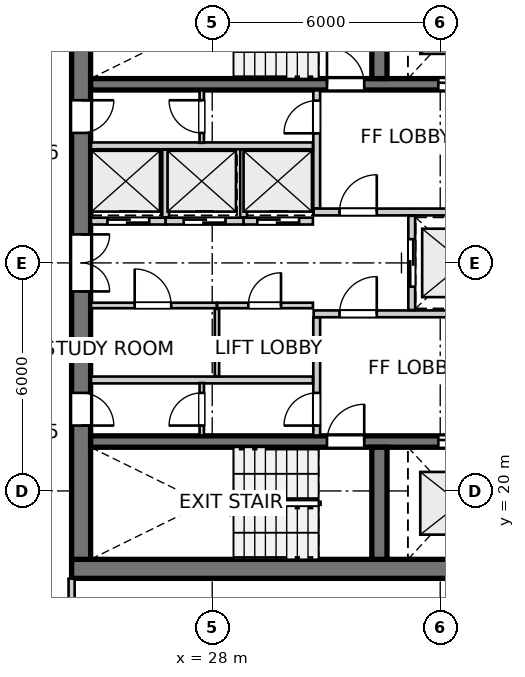
"""IFC4 building model, lengths in metres.
Left out: names, types, materials, properties, quantities, classifications, styles, units other than length and angle.
Written with IfcOpenShell. Run it as: python <this file> out.ifc"""

import sys

from ifc_helpers import new_model, si_unit, direction, frame, frame_2d, origin, place, context, subcontext, project, spatial, rectangle, extrude, source, transform, mapped, element, fill, save


model = new_model("IFC4")
c1 = context("Model", 3, precision=1e-05, world=origin(), true_north=direction((0.0, 1.0)))
c2 = subcontext(c1, "Body", "Model", "MODEL_VIEW")
j1 = project(units=[si_unit("LENGTHUNIT", "METRE"), si_unit("PLANEANGLEUNIT", "RADIAN")], contexts=[c1])
p1 = place(None, origin())
s1 = spatial("IfcSite", under=j1, at=p1, CompositionType="ELEMENT")
p2 = place(p1, origin())
s2 = spatial("IfcBuilding", under=s1, at=p2, CompositionType="ELEMENT")
p3 = place(p2, frame((0.0, 0.0, 205.2)))
s3 = spatial("IfcBuildingStorey", under=s2, at=p3, CompositionType="ELEMENT", Elevation=205.2)
p4 = place(p3, frame((24.3, 17.95, 0.0), z_axis=(0.0, 0.0, 1.0), x_axis=(1.0, 0.0, 0.0)))
e1 = element("IfcWall", 1, at=p4, inside=s3, PredefinedType="SHEAR", context=c2, shape_type="SweptSolid", body=[
    extrude(rectangle(XDim=12.1, YDim=0.5, at=frame_2d((6.05, 0.0))), origin(), (0.0, 0.0, 1.0), 2.935),
])
p5 = place(p3, frame((24.55, 33.8, 0.0), z_axis=(0.0, 0.0, 1.0), x_axis=(0.0, -1.0, 0.0)))
e2 = element("IfcWall", 2, at=p5, inside=s3, PredefinedType="SHEAR", context=c2, shape_type="SweptSolid", body=[
    extrude(rectangle(XDim=15.6, YDim=0.5, at=frame_2d((7.8, 0.0))), origin(), (0.0, 0.0, 1.0), 2.935),
])
p6 = place(p5, frame((7.05, 0.0, 0.0)))
e3 = element("IfcOpeningElement", 3, at=p6, cuts=e2, PredefinedType="OPENING", context=c2, shape_type="SweptSolid", body=[
    extrude(rectangle(XDim=1.5, YDim=2.15, at=frame_2d((0.75, 1.075))), frame((0.0, 0.26, 0.0), z_axis=(0.0, -1.0, 0.0), x_axis=(1.0, 0.0, 0.0)), (0.0, 0.0, 1.0), 0.52),
])
p7 = place(p5, frame((3.52, 0.0, 0.0)))
e4 = element("IfcOpeningElement", 4, at=p7, cuts=e2, PredefinedType="OPENING", context=c2, shape_type="SweptSolid", body=[
    extrude(rectangle(XDim=0.86, YDim=2.05, at=frame_2d((0.43, 1.025))), frame((0.0, 0.26, 0.0), z_axis=(0.0, -1.0, 0.0), x_axis=(1.0, 0.0, 0.0)), (0.0, 0.0, 1.0), 0.52),
])
p8 = place(p5, frame((11.22, 0.0, 0.0)))
e5 = element("IfcOpeningElement", 5, at=p8, cuts=e2, PredefinedType="OPENING", context=c2, shape_type="SweptSolid", body=[
    extrude(rectangle(XDim=0.86, YDim=2.05, at=frame_2d((0.43, 1.025))), frame((0.0, 0.26, 0.0), z_axis=(0.0, -1.0, 0.0), x_axis=(1.0, 0.0, 0.0)), (0.0, 0.0, 1.0), 0.52),
])
p9 = place(p3, frame((24.8, 21.3, 0.0), z_axis=(0.0, 0.0, 1.0), x_axis=(1.0, 0.0, 0.0)))
e6 = element("IfcWall", 6, at=p9, inside=s3, PredefinedType="SHEAR", context=c2, shape_type="SweptSolid", body=[
    extrude(rectangle(XDim=11.1, YDim=0.3, at=frame_2d((5.55, 0.0))), origin(), (0.0, 0.0, 1.0), 2.935),
])
p10 = place(p9, frame((6.22, 0.0, 0.0)))
e7 = element("IfcOpeningElement", 7, at=p10, cuts=e6, PredefinedType="OPENING", context=c2, shape_type="SweptSolid", body=[
    extrude(rectangle(XDim=0.98, YDim=2.15, at=frame_2d((0.49, 1.075))), frame((0.0, 0.16, 0.0), z_axis=(0.0, -1.0, 0.0), x_axis=(1.0, 0.0, 0.0)), (0.0, 0.0, 1.0), 0.32),
])
p11 = place(p9, frame((9.15, 0.0, 0.0)))
e8 = element("IfcOpeningElement", 8, at=p11, cuts=e6, PredefinedType="OPENING", context=c2, shape_type="SweptSolid", body=[
    extrude(rectangle(XDim=1.15, YDim=2.15, at=frame_2d((0.575, 1.075))), frame((0.0, 0.16, 0.0), z_axis=(0.0, -1.0, 0.0), x_axis=(1.0, 0.0, 0.0)), (0.0, 0.0, 1.0), 0.32),
])
p12 = place(p3, frame((32.4, 18.2, 0.0), z_axis=(0.0, 0.0, 1.0), x_axis=(0.0, 1.0, 0.0)))
e9 = element("IfcWall", 9, at=p12, inside=s3, PredefinedType="SHEAR", context=c2, shape_type="SweptSolid", body=[
    extrude(rectangle(XDim=2.95, YDim=0.4, at=frame_2d((1.475, 0.0))), origin(), (0.0, 0.0, 1.0), 2.935),
])
p13 = place(p3, frame((24.8, 30.7, 0.0), z_axis=(0.0, 0.0, 1.0), x_axis=(1.0, 0.0, 0.0)))
e10 = element("IfcWall", 10, at=p13, inside=s3, PredefinedType="SHEAR", context=c2, shape_type="SweptSolid", body=[
    extrude(rectangle(XDim=11.1, YDim=0.3, at=frame_2d((5.55, 0.0))), origin(), (0.0, 0.0, 1.0), 2.935),
])
p14 = place(p13, frame((6.22, 0.0, 0.0)))
e11 = element("IfcOpeningElement", 11, at=p14, cuts=e10, PredefinedType="OPENING", context=c2, shape_type="SweptSolid", body=[
    extrude(rectangle(XDim=0.98, YDim=2.15, at=frame_2d((0.49, 1.075))), frame((0.0, 0.16, 0.0), z_axis=(0.0, -1.0, 0.0), x_axis=(1.0, 0.0, 0.0)), (0.0, 0.0, 1.0), 0.32),
])
p15 = place(p13, frame((9.15, 0.0, 0.0)))
e12 = element("IfcOpeningElement", 12, at=p15, cuts=e10, PredefinedType="OPENING", context=c2, shape_type="SweptSolid", body=[
    extrude(rectangle(XDim=1.15, YDim=2.15, at=frame_2d((0.575, 1.075))), frame((0.0, 0.16, 0.0), z_axis=(0.0, -1.0, 0.0), x_axis=(1.0, 0.0, 0.0)), (0.0, 0.0, 1.0), 0.32),
])
p16 = place(p3, frame((32.4, 30.85, 0.0), z_axis=(0.0, 0.0, 1.0), x_axis=(0.0, 1.0, 0.0)))
e13 = element("IfcWall", 13, at=p16, inside=s3, PredefinedType="SHEAR", context=c2, shape_type="SweptSolid", body=[
    extrude(rectangle(XDim=2.95, YDim=0.4, at=frame_2d((1.475, 0.0))), origin(), (0.0, 0.0, 1.0), 2.935),
])
p17 = place(p3, frame((30.75, 21.46, 0.0), z_axis=(0.0, 0.0, 1.0), x_axis=(0.0, 1.0, 0.0)))
e14 = element("IfcWall", 14, at=p17, inside=s3, PredefinedType="PARTITIONING", context=c2, shape_type="SweptSolid", body=[
    extrude(rectangle(XDim=3.11, YDim=0.18, at=frame_2d((1.555, 0.0))), origin(), (0.0, 0.0, 1.0), 2.935),
])
p18 = place(p17, frame((0.26, 0.0, 0.0)))
e15 = element("IfcOpeningElement", 15, at=p18, cuts=e14, PredefinedType="OPENING", context=c2, shape_type="SweptSolid", body=[
    extrude(rectangle(XDim=0.86, YDim=2.05, at=frame_2d((0.43, 1.025))), frame((0.0, 0.1, 0.0), z_axis=(0.0, -1.0, 0.0), x_axis=(1.0, 0.0, 0.0)), (0.0, 0.0, 1.0), 0.2),
])
p19 = place(p3, frame((30.67, 24.66, 0.0), z_axis=(0.0, 0.0, 1.0), x_axis=(1.0, 0.0, 0.0)))
e16 = element("IfcWall", 16, at=p19, inside=s3, PredefinedType="PARTITIONING", context=c2, shape_type="SweptSolid", body=[
    extrude(rectangle(XDim=5.22, YDim=0.18, at=frame_2d((2.61, 0.0))), origin(), (0.0, 0.0, 1.0), 2.935),
])
p20 = place(p19, frame((0.68, 0.0, 0.0)))
e17 = element("IfcOpeningElement", 17, at=p20, cuts=e16, PredefinedType="OPENING", context=c2, shape_type="SweptSolid", body=[
    extrude(rectangle(XDim=0.98, YDim=2.15, at=frame_2d((0.49, 1.075))), frame((0.0, 0.1, 0.0), z_axis=(0.0, -1.0, 0.0), x_axis=(1.0, 0.0, 0.0)), (0.0, 0.0, 1.0), 0.2),
])
p21 = place(p3, frame((30.75, 27.43, 0.0), z_axis=(0.0, 0.0, 1.0), x_axis=(0.0, 1.0, 0.0)))
e18 = element("IfcWall", 18, at=p21, inside=s3, PredefinedType="PARTITIONING", context=c2, shape_type="SweptSolid", body=[
    extrude(rectangle(XDim=3.11, YDim=0.18, at=frame_2d((1.555, 0.0))), origin(), (0.0, 0.0, 1.0), 2.935),
])
p22 = place(p21, frame((1.98, 0.0, 0.0)))
e19 = element("IfcOpeningElement", 19, at=p22, cuts=e18, PredefinedType="OPENING", context=c2, shape_type="SweptSolid", body=[
    extrude(rectangle(XDim=0.86, YDim=2.05, at=frame_2d((0.43, 1.025))), frame((0.0, 0.1, 0.0), z_axis=(0.0, -1.0, 0.0), x_axis=(1.0, 0.0, 0.0)), (0.0, 0.0, 1.0), 0.2),
])
p23 = place(p3, frame((30.67, 27.34, 0.0), z_axis=(0.0, 0.0, 1.0), x_axis=(1.0, 0.0, 0.0)))
e20 = element("IfcWall", 20, at=p23, inside=s3, PredefinedType="PARTITIONING", context=c2, shape_type="SweptSolid", body=[
    extrude(rectangle(XDim=5.22, YDim=0.18, at=frame_2d((2.61, 0.0))), origin(), (0.0, 0.0, 1.0), 2.935),
])
p24 = place(p23, frame((0.68, 0.0, 0.0)))
e21 = element("IfcOpeningElement", 21, at=p24, cuts=e20, PredefinedType="OPENING", context=c2, shape_type="SweptSolid", body=[
    extrude(rectangle(XDim=0.98, YDim=2.15, at=frame_2d((0.49, 1.075))), frame((0.0, 0.1, 0.0), z_axis=(0.0, -1.0, 0.0), x_axis=(1.0, 0.0, 0.0)), (0.0, 0.0, 1.0), 0.2),
])
p25 = place(p3, frame((33.25, 24.76, 0.0), z_axis=(0.0, 0.0, 1.0), x_axis=(0.0, 1.0, 0.0)))
e22 = element("IfcWall", 22, at=p25, inside=s3, PredefinedType="PARTITIONING", context=c2, shape_type="SweptSolid", body=[
    extrude(rectangle(XDim=2.48, YDim=0.18, at=frame_2d((1.24, 0.0))), origin(), (0.0, 0.0, 1.0), 2.935),
])
p26 = place(p25, frame((0.615, 0.0, 0.0)))
e23 = element("IfcOpeningElement", 23, at=p26, cuts=e22, PredefinedType="OPENING", context=c2, shape_type="SweptSolid", body=[
    extrude(rectangle(XDim=1.25, YDim=2.15, at=frame_2d((0.625, 1.075))), frame((0.0, 0.1, 0.0), z_axis=(0.0, -1.0, 0.0), x_axis=(1.0, 0.0, 0.0)), (0.0, 0.0, 1.0), 0.2),
])
p27 = place(p3, frame((24.81, 22.92, 0.0), z_axis=(0.0, 0.0, 1.0), x_axis=(1.0, 0.0, 0.0)))
e24 = element("IfcWall", 24, at=p27, inside=s3, PredefinedType="PARTITIONING", context=c2, shape_type="SweptSolid", body=[
    extrude(rectangle(XDim=5.84, YDim=0.18, at=frame_2d((2.92, 0.0))), origin(), (0.0, 0.0, 1.0), 2.935),
])
p28 = place(p3, frame((24.81, 24.88, 0.0), z_axis=(0.0, 0.0, 1.0), x_axis=(1.0, 0.0, 0.0)))
e25 = element("IfcWall", 25, at=p28, inside=s3, PredefinedType="PARTITIONING", context=c2, shape_type="SweptSolid", body=[
    extrude(rectangle(XDim=3.31, YDim=0.145, at=frame_2d((1.655, 0.0))), origin(), (0.0, 0.0, 1.0), 2.935),
])
p29 = place(p28, frame((1.15, 0.0, 0.0)))
e26 = element("IfcOpeningElement", 26, at=p29, cuts=e25, PredefinedType="OPENING", context=c2, shape_type="SweptSolid", body=[
    extrude(rectangle(XDim=0.96, YDim=2.1, at=frame_2d((0.48, 1.05))), frame((0.0, 0.083, 0.0), z_axis=(0.0, -1.0, 0.0), x_axis=(1.0, 0.0, 0.0)), (0.0, 0.0, 1.0), 0.165),
])
p30 = place(p3, frame((28.13, 24.88, 0.0), z_axis=(0.0, 0.0, 1.0), x_axis=(1.0, 0.0, 0.0)))
e27 = element("IfcWall", 27, at=p30, inside=s3, PredefinedType="PARTITIONING", context=c2, shape_type="SweptSolid", body=[
    extrude(rectangle(XDim=2.52, YDim=0.145, at=frame_2d((1.26, 0.0))), origin(), (0.0, 0.0, 1.0), 2.935),
])
p31 = place(p30, frame((0.82, 0.0, 0.0)))
e28 = element("IfcOpeningElement", 28, at=p31, cuts=e27, PredefinedType="OPENING", context=c2, shape_type="SweptSolid", body=[
    extrude(rectangle(XDim=0.86, YDim=2.05, at=frame_2d((0.43, 1.025))), frame((0.0, 0.083, 0.0), z_axis=(0.0, -1.0, 0.0), x_axis=(1.0, 0.0, 0.0)), (0.0, 0.0, 1.0), 0.165),
])
p32 = place(p3, frame((28.125, 23.02, 0.0), z_axis=(0.0, 0.0, 1.0), x_axis=(0.0, 1.0, 0.0)))
e29 = element("IfcWall", 29, at=p32, inside=s3, PredefinedType="PARTITIONING", context=c2, shape_type="SweptSolid", body=[
    extrude(rectangle(XDim=1.77, YDim=0.115, at=frame_2d((0.885, 0.0))), origin(), (0.0, 0.0, 1.0), 2.935),
])
p33 = place(p3, frame((24.81, 29.08, 0.0), z_axis=(0.0, 0.0, 1.0), x_axis=(1.0, 0.0, 0.0)))
e30 = element("IfcWall", 30, at=p33, inside=s3, PredefinedType="PARTITIONING", context=c2, shape_type="SweptSolid", body=[
    extrude(rectangle(XDim=5.84, YDim=0.18, at=frame_2d((2.92, 0.0))), origin(), (0.0, 0.0, 1.0), 2.935),
])
p34 = place(p3, frame((24.81, 27.1, 0.0), z_axis=(0.0, 0.0, 1.0), x_axis=(1.0, 0.0, 0.0)))
e31 = element("IfcWall", 31, at=p34, inside=s3, PredefinedType="PARTITIONING", context=c2, shape_type="SweptSolid", body=[
    extrude(rectangle(XDim=1.965, YDim=0.18, at=frame_2d((0.982, 0.0))), origin(), (0.0, 0.0, 1.0), 2.935),
])
p35 = place(p34, frame((0.433, 0.0, 0.0)))
e32 = element("IfcOpeningElement", 32, at=p35, cuts=e31, PredefinedType="OPENING", context=c2, shape_type="SweptSolid", body=[
    extrude(rectangle(XDim=1.1, YDim=2.15, at=frame_2d((0.55, 1.075))), frame((0.0, 0.1, 0.0), z_axis=(0.0, -1.0, 0.0), x_axis=(1.0, 0.0, 0.0)), (0.0, 0.0, 1.0), 0.2),
])
p36 = place(p3, frame((26.775, 27.1, 0.0), z_axis=(0.0, 0.0, 1.0), x_axis=(1.0, 0.0, 0.0)))
e33 = element("IfcWall", 33, at=p36, inside=s3, PredefinedType="PARTITIONING", context=c2, shape_type="SweptSolid", body=[
    extrude(rectangle(XDim=2.05, YDim=0.18, at=frame_2d((1.025, 0.0))), origin(), (0.0, 0.0, 1.0), 2.935),
])
p37 = place(p36, frame((0.475, 0.0, 0.0)))
e34 = element("IfcOpeningElement", 34, at=p37, cuts=e33, PredefinedType="OPENING", context=c2, shape_type="SweptSolid", body=[
    extrude(rectangle(XDim=1.1, YDim=2.15, at=frame_2d((0.55, 1.075))), frame((0.0, 0.1, 0.0), z_axis=(0.0, -1.0, 0.0), x_axis=(1.0, 0.0, 0.0)), (0.0, 0.0, 1.0), 0.2),
])
p38 = place(p3, frame((26.775, 27.2, 0.0), z_axis=(0.0, 0.0, 1.0), x_axis=(0.0, 1.0, 0.0)))
e35 = element("IfcWall", 35, at=p38, inside=s3, PredefinedType="PARTITIONING", context=c2, shape_type="SweptSolid", body=[
    extrude(rectangle(XDim=1.78, YDim=0.18, at=frame_2d((0.89, 0.0))), origin(), (0.0, 0.0, 1.0), 2.935),
])
p39 = place(p3, frame((28.825, 27.1, 0.0), z_axis=(0.0, 0.0, 1.0), x_axis=(1.0, 0.0, 0.0)))
e36 = element("IfcWall", 36, at=p39, inside=s3, PredefinedType="PARTITIONING", context=c2, shape_type="SweptSolid", body=[
    extrude(rectangle(XDim=1.825, YDim=0.18, at=frame_2d((0.913, 0.0))), origin(), (0.0, 0.0, 1.0), 2.935),
])
p40 = place(p39, frame((0.363, 0.0, 0.0)))
e37 = element("IfcOpeningElement", 37, at=p40, cuts=e36, PredefinedType="OPENING", context=c2, shape_type="SweptSolid", body=[
    extrude(rectangle(XDim=1.1, YDim=2.15, at=frame_2d((0.55, 1.075))), frame((0.0, 0.1, 0.0), z_axis=(0.0, -1.0, 0.0), x_axis=(1.0, 0.0, 0.0)), (0.0, 0.0, 1.0), 0.2),
])
p41 = place(p3, frame((28.825, 27.2, 0.0), z_axis=(0.0, 0.0, 1.0), x_axis=(0.0, 1.0, 0.0)))
e38 = element("IfcWall", 38, at=p41, inside=s3, PredefinedType="PARTITIONING", context=c2, shape_type="SweptSolid", body=[
    extrude(rectangle(XDim=1.78, YDim=0.18, at=frame_2d((0.89, 0.0))), origin(), (0.0, 0.0, 1.0), 2.935),
])
p42 = place(p3, frame((27.725, 21.46, 0.0), z_axis=(0.0, 0.0, 1.0), x_axis=(0.0, 1.0, 0.0)))
e39 = element("IfcWall", 39, at=p42, inside=s3, PredefinedType="PARTITIONING", context=c2, shape_type="SweptSolid", body=[
    extrude(rectangle(XDim=1.38, YDim=0.115, at=frame_2d((0.69, 0.0))), origin(), (0.0, 0.0, 1.0), 2.935),
])
p43 = place(p42, frame((0.26, 0.0, 0.0)))
e40 = element("IfcOpeningElement", 40, at=p43, cuts=e39, PredefinedType="OPENING", context=c2, shape_type="SweptSolid", body=[
    extrude(rectangle(XDim=0.86, YDim=2.05, at=frame_2d((0.43, 1.025))), frame((0.0, 0.067, 0.0), z_axis=(0.0, -1.0, 0.0), x_axis=(1.0, 0.0, 0.0)), (0.0, 0.0, 1.0), 0.135),
])
p44 = place(p3, frame((27.725, 29.16, 0.0), z_axis=(0.0, 0.0, 1.0), x_axis=(0.0, 1.0, 0.0)))
e41 = element("IfcWall", 41, at=p44, inside=s3, PredefinedType="PARTITIONING", context=c2, shape_type="SweptSolid", body=[
    extrude(rectangle(XDim=1.38, YDim=0.115, at=frame_2d((0.69, 0.0))), origin(), (0.0, 0.0, 1.0), 2.935),
])
p45 = place(p44, frame((0.26, 0.0, 0.0)))
e42 = element("IfcOpeningElement", 42, at=p45, cuts=e41, PredefinedType="OPENING", context=c2, shape_type="SweptSolid", body=[
    extrude(rectangle(XDim=0.86, YDim=2.05, at=frame_2d((0.43, 1.025))), frame((0.0, 0.067, 0.0), z_axis=(0.0, -1.0, 0.0), x_axis=(1.0, 0.0, 0.0)), (0.0, 0.0, 1.0), 0.135),
])
p46 = place(p3, frame((24.3, 15.002, 0.0), z_axis=(0.0, 0.0, 1.0), x_axis=(0.0, 1.0, 0.0)))
e43 = element("IfcWall", 43, at=p46, inside=s3, PredefinedType="PARTITIONING", context=c2, shape_type="SweptSolid", body=[
    extrude(rectangle(XDim=2.69, YDim=0.16, at=frame_2d((1.345, 0.0))), origin(), (0.0, 0.0, 1.0), 2.935),
])
m1 = source(origin(), c2, "Body", "SweptSolid", [
    extrude(rectangle(XDim=0.98, YDim=2.15, at=frame_2d((0.49, 1.075))), frame((0.0, 0.025, 0.0), z_axis=(0.0, -1.0, 0.0), x_axis=(1.0, 0.0, 0.0)), (0.0, 0.0, 1.0), 0.05),
])
p47 = place(p10, origin())
e44 = element("IfcDoor", 44, at=p47, inside=s3, OperationType="SINGLE_SWING_RIGHT", PredefinedType="DOOR", context=c2, shape_type="MappedRepresentation", body=[
    mapped(m1, transform((0.0, 0.0, 0.0), x_axis=(1.0, 0.0, 0.0), y_axis=(0.0, 1.0, 0.0), z_axis=(0.0, 0.0, 1.0), scale=1.0)),
])
fill(e7, e44)
m2 = source(origin(), c2, "Body", "SweptSolid", [
    extrude(rectangle(XDim=1.15, YDim=2.15, at=frame_2d((0.575, 1.075))), frame((0.0, 0.025, 0.0), z_axis=(0.0, -1.0, 0.0), x_axis=(1.0, 0.0, 0.0)), (0.0, 0.0, 1.0), 0.05),
])
p48 = place(p11, origin())
e45 = element("IfcDoor", 45, at=p48, inside=s3, OperationType="DOUBLE_DOOR_SLIDING", PredefinedType="DOOR", context=c2, shape_type="MappedRepresentation", body=[
    mapped(m2, transform((0.0, 0.0, 0.0), x_axis=(1.0, 0.0, 0.0), y_axis=(0.0, 1.0, 0.0), z_axis=(0.0, 0.0, 1.0), scale=1.0)),
])
fill(e8, e45)
p49 = place(p14, origin())
e46 = element("IfcDoor", 46, at=p49, inside=s3, OperationType="SINGLE_SWING_LEFT", PredefinedType="DOOR", context=c2, shape_type="MappedRepresentation", body=[
    mapped(m1, transform((0.0, 0.0, 0.0), x_axis=(1.0, 0.0, 0.0), y_axis=(0.0, 1.0, 0.0), z_axis=(0.0, 0.0, 1.0), scale=1.0)),
])
fill(e11, e46)
p50 = place(p15, origin())
e47 = element("IfcDoor", 47, at=p50, inside=s3, OperationType="DOUBLE_DOOR_SLIDING", PredefinedType="DOOR", context=c2, shape_type="MappedRepresentation", body=[
    mapped(m2, transform((0.0, 0.0, 0.0), x_axis=(1.0, 0.0, 0.0), y_axis=(0.0, 1.0, 0.0), z_axis=(0.0, 0.0, 1.0), scale=1.0)),
])
fill(e12, e47)
m3 = source(origin(), c2, "Body", "SweptSolid", [
    extrude(rectangle(XDim=1.5, YDim=2.15, at=frame_2d((0.75, 1.075))), frame((0.0, 0.025, 0.0), z_axis=(0.0, -1.0, 0.0), x_axis=(1.0, 0.0, 0.0)), (0.0, 0.0, 1.0), 0.05),
])
p51 = place(p6, origin())
e48 = element("IfcDoor", 48, at=p51, inside=s3, OperationType="DOUBLE_DOOR_SINGLE_SWING", PredefinedType="DOOR", context=c2, shape_type="MappedRepresentation", body=[
    mapped(m3, transform((0.0, 0.0, 0.0), x_axis=(1.0, 0.0, 0.0), y_axis=(0.0, 1.0, 0.0), z_axis=(0.0, 0.0, 1.0), scale=1.0)),
])
fill(e3, e48)
m4 = source(origin(), c2, "Body", "SweptSolid", [
    extrude(rectangle(XDim=0.86, YDim=2.05, at=frame_2d((0.43, 1.025))), frame((0.0, 0.025, 0.0), z_axis=(0.0, -1.0, 0.0), x_axis=(1.0, 0.0, 0.0)), (0.0, 0.0, 1.0), 0.05),
])
p52 = place(p7, origin())
e49 = element("IfcDoor", 49, at=p52, inside=s3, OperationType="SINGLE_SWING_LEFT", PredefinedType="DOOR", context=c2, shape_type="MappedRepresentation", body=[
    mapped(m4, transform((0.0, 0.0, 0.0), x_axis=(1.0, 0.0, 0.0), y_axis=(0.0, 1.0, 0.0), z_axis=(0.0, 0.0, 1.0), scale=1.0)),
])
fill(e4, e49)
p53 = place(p8, origin())
e50 = element("IfcDoor", 50, at=p53, inside=s3, OperationType="SINGLE_SWING_RIGHT", PredefinedType="DOOR", context=c2, shape_type="MappedRepresentation", body=[
    mapped(m4, transform((0.0, 0.0, 0.0), x_axis=(1.0, 0.0, 0.0), y_axis=(0.0, 1.0, 0.0), z_axis=(0.0, 0.0, 1.0), scale=1.0)),
])
fill(e5, e50)
p54 = place(p18, origin())
e51 = element("IfcDoor", 51, at=p54, inside=s3, OperationType="SINGLE_SWING_LEFT", PredefinedType="DOOR", context=c2, shape_type="MappedRepresentation", body=[
    mapped(m4, transform((0.0, 0.0, 0.0), x_axis=(1.0, 0.0, 0.0), y_axis=(0.0, 1.0, 0.0), z_axis=(0.0, 0.0, 1.0), scale=1.0)),
])
fill(e15, e51)
p55 = place(p20, origin())
e52 = element("IfcDoor", 52, at=p55, inside=s3, OperationType="SINGLE_SWING_RIGHT", PredefinedType="DOOR", context=c2, shape_type="MappedRepresentation", body=[
    mapped(m1, transform((0.0, 0.0, 0.0), x_axis=(1.0, 0.0, 0.0), y_axis=(0.0, 1.0, 0.0), z_axis=(0.0, 0.0, 1.0), scale=1.0)),
])
fill(e17, e52)
p56 = place(p22, origin())
e53 = element("IfcDoor", 53, at=p56, inside=s3, OperationType="SINGLE_SWING_LEFT", PredefinedType="DOOR", context=c2, shape_type="MappedRepresentation", body=[
    mapped(m4, transform((0.0, 0.0, 0.0), x_axis=(1.0, 0.0, 0.0), y_axis=(0.0, 1.0, 0.0), z_axis=(0.0, 0.0, 1.0), scale=1.0)),
])
fill(e19, e53)
p57 = place(p24, origin())
e54 = element("IfcDoor", 54, at=p57, inside=s3, OperationType="SINGLE_SWING_RIGHT", PredefinedType="DOOR", context=c2, shape_type="MappedRepresentation", body=[
    mapped(m1, transform((0.0, 0.0, 0.0), x_axis=(1.0, 0.0, 0.0), y_axis=(0.0, 1.0, 0.0), z_axis=(0.0, 0.0, 1.0), scale=1.0)),
])
fill(e21, e54)
m5 = source(origin(), c2, "Body", "SweptSolid", [
    extrude(rectangle(XDim=1.25, YDim=2.15, at=frame_2d((0.625, 1.075))), frame((0.0, 0.025, 0.0), z_axis=(0.0, -1.0, 0.0), x_axis=(1.0, 0.0, 0.0)), (0.0, 0.0, 1.0), 0.05),
])
p58 = place(p26, origin())
e55 = element("IfcDoor", 55, at=p58, inside=s3, OperationType="DOUBLE_DOOR_SLIDING", PredefinedType="DOOR", context=c2, shape_type="MappedRepresentation", body=[
    mapped(m5, transform((0.0, 0.0, 0.0), x_axis=(1.0, 0.0, 0.0), y_axis=(0.0, 1.0, 0.0), z_axis=(0.0, 0.0, 1.0), scale=1.0)),
])
fill(e23, e55)
m6 = source(origin(), c2, "Body", "SweptSolid", [
    extrude(rectangle(XDim=0.96, YDim=2.1, at=frame_2d((0.48, 1.05))), frame((0.0, 0.025, 0.0), z_axis=(0.0, -1.0, 0.0), x_axis=(1.0, 0.0, 0.0)), (0.0, 0.0, 1.0), 0.05),
])
p59 = place(p29, origin())
e56 = element("IfcDoor", 56, at=p59, inside=s3, OperationType="SINGLE_SWING_LEFT", PredefinedType="DOOR", context=c2, shape_type="MappedRepresentation", body=[
    mapped(m6, transform((0.0, 0.0, 0.0), x_axis=(1.0, 0.0, 0.0), y_axis=(0.0, 1.0, 0.0), z_axis=(0.0, 0.0, 1.0), scale=1.0)),
])
fill(e26, e56)
p60 = place(p31, origin())
e57 = element("IfcDoor", 57, at=p60, inside=s3, OperationType="SINGLE_SWING_RIGHT", PredefinedType="DOOR", context=c2, shape_type="MappedRepresentation", body=[
    mapped(m4, transform((0.0, 0.0, 0.0), x_axis=(1.0, 0.0, 0.0), y_axis=(0.0, 1.0, 0.0), z_axis=(0.0, 0.0, 1.0), scale=1.0)),
])
fill(e28, e57)
m7 = source(origin(), c2, "Body", "SweptSolid", [
    extrude(rectangle(XDim=1.1, YDim=2.15, at=frame_2d((0.55, 1.075))), frame((0.0, 0.025, 0.0), z_axis=(0.0, -1.0, 0.0), x_axis=(1.0, 0.0, 0.0)), (0.0, 0.0, 1.0), 0.05),
])
p61 = place(p35, origin())
e58 = element("IfcDoor", 58, at=p61, inside=s3, OperationType="DOUBLE_DOOR_SLIDING", PredefinedType="DOOR", context=c2, shape_type="MappedRepresentation", body=[
    mapped(m7, transform((0.0, 0.0, 0.0), x_axis=(1.0, 0.0, 0.0), y_axis=(0.0, 1.0, 0.0), z_axis=(0.0, 0.0, 1.0), scale=1.0)),
])
fill(e32, e58)
p62 = place(p37, origin())
e59 = element("IfcDoor", 59, at=p62, inside=s3, OperationType="DOUBLE_DOOR_SLIDING", PredefinedType="DOOR", context=c2, shape_type="MappedRepresentation", body=[
    mapped(m7, transform((0.0, 0.0, 0.0), x_axis=(1.0, 0.0, 0.0), y_axis=(0.0, 1.0, 0.0), z_axis=(0.0, 0.0, 1.0), scale=1.0)),
])
fill(e34, e59)
p63 = place(p40, origin())
e60 = element("IfcDoor", 60, at=p63, inside=s3, OperationType="DOUBLE_DOOR_SLIDING", PredefinedType="DOOR", context=c2, shape_type="MappedRepresentation", body=[
    mapped(m7, transform((0.0, 0.0, 0.0), x_axis=(1.0, 0.0, 0.0), y_axis=(0.0, 1.0, 0.0), z_axis=(0.0, 0.0, 1.0), scale=1.0)),
])
fill(e37, e60)
p64 = place(p43, origin())
e61 = element("IfcDoor", 61, at=p64, inside=s3, OperationType="SINGLE_SWING_LEFT", PredefinedType="DOOR", context=c2, shape_type="MappedRepresentation", body=[
    mapped(m4, transform((0.0, 0.0, 0.0), x_axis=(1.0, 0.0, 0.0), y_axis=(0.0, 1.0, 0.0), z_axis=(0.0, 0.0, 1.0), scale=1.0)),
])
fill(e40, e61)
p65 = place(p45, origin())
e62 = element("IfcDoor", 62, at=p65, inside=s3, OperationType="SINGLE_SWING_RIGHT", PredefinedType="DOOR", context=c2, shape_type="MappedRepresentation", body=[
    mapped(m4, transform((0.0, 0.0, 0.0), x_axis=(1.0, 0.0, 0.0), y_axis=(0.0, 1.0, 0.0), z_axis=(0.0, 0.0, 1.0), scale=1.0)),
])
fill(e42, e62)
save(model, sys.argv[1])
